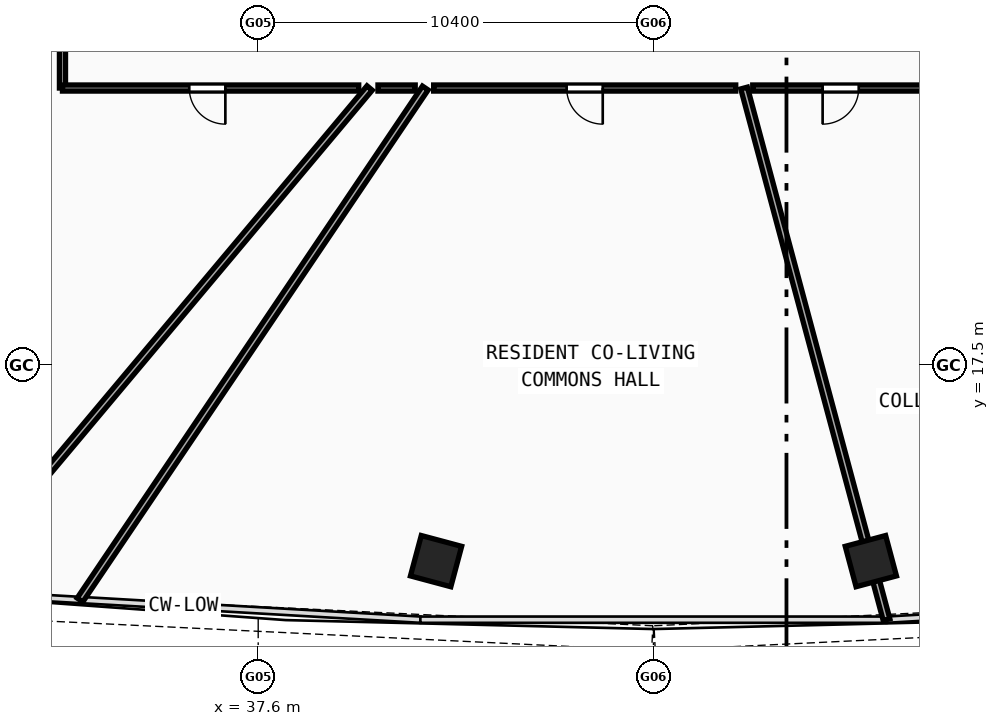
"""IFC4 building model, lengths in metres.
Left out: names, types, materials, properties, quantities, classifications, styles, units other than length and angle.
Written with IfcOpenShell. Run it as: python <this file> out.ifc"""

import sys

from ifc_helpers import new_model, si_unit, direction, frame, frame_2d, origin, origin_with_axes, origin_2d, place, context, subcontext, project, spatial, rectangle, hollow_rectangle, extrude, source, transform, mapped, element, fill, save


model = new_model("IFC4")
c1 = context("Model", 3, precision=1e-05, world=origin(), true_north=direction((0.0, 1.0)))
c2 = subcontext(c1, "Body", "Model", "MODEL_VIEW")
j1 = project(units=[si_unit("LENGTHUNIT", "METRE"), si_unit("PLANEANGLEUNIT", "RADIAN")], contexts=[c1])
p1 = place(None, origin())
s1 = spatial("IfcSite", under=j1, at=p1, CompositionType="ELEMENT")
p2 = place(p1, origin())
s2 = spatial("IfcBuilding", under=s1, at=p2, CompositionType="ELEMENT")
p3 = place(p2, frame((0.0, 0.0, 41.29)))
s3 = spatial("IfcBuildingStorey", under=s2, at=p3, CompositionType="ELEMENT", Elevation=41.29)
m1 = source(origin(), c2, "Body", "SweptSolid", [
    extrude(hollow_rectangle(XDim=1.1, YDim=1.1, WallThickness=0.045, at=origin_2d()), origin(), (0.0, 0.0, 1.0), 3.63),
])
for number, where, z_axis, x_axis in (
    (1, (42.28, 12.352, -0.26), (0.0, 0.0, 1.0), (0.966, -0.259, 0.0)),
    (2, (53.72, 12.352, -0.26), (0.0, 0.0, 1.0), (0.966, 0.259, 0.0)),
):
    element("IfcColumn", number, at=place(p3, frame(where, z_axis=z_axis, x_axis=x_axis)), inside=s3, PredefinedType="COLUMN", context=c2, shape_type="MappedRepresentation", body=[
        mapped(m1, transform((0.0, 0.0, 0.0), scale=1.0)),
    ])
p4 = place(p3, frame((40.532, 24.8, 0.0), z_axis=(0.0, 0.0, 1.0), x_axis=(-0.642784696521, -0.766046887546, 0.0)))
e3 = element("IfcWall", 3, at=p4, inside=s3, PredefinedType="PARTITIONING", context=c2, shape_type="SweptSolid", body=[
    extrude(rectangle(XDim=17.319, YDim=0.18, at=frame_2d((8.659, 0.0))), origin(), (0.0, 0.0, 1.0), 2.67),
])
p5 = place(p3, frame((41.997, 24.8, 0.0), z_axis=(0.0, 0.0, 1.0), x_axis=(-0.559182499599, -0.82904458996, 0.0)))
e4 = element("IfcWall", 4, at=p5, inside=s3, PredefinedType="PARTITIONING", context=c2, shape_type="SweptSolid", body=[
    extrude(rectangle(XDim=16.248, YDim=0.18, at=frame_2d((8.124, 0.0))), origin(), (0.0, 0.0, 1.0), 2.67),
])
p6 = place(p3, frame((50.385, 24.8, 0.0), z_axis=(0.0, 0.0, 1.0), x_axis=(0.258819787056, -0.965925627483, 0.0)))
e5 = element("IfcWall", 5, at=p6, inside=s3, PredefinedType="PARTITIONING", context=c2, shape_type="SweptSolid", body=[
    extrude(rectangle(XDim=14.482, YDim=0.18, at=frame_2d((7.241, 0.0))), origin(), (0.0, 0.0, 1.0), 2.67),
])
p7 = place(p3, frame((32.45, 24.8, 0.0), z_axis=(0.0, 0.0, 1.0), x_axis=(0.0, 1.0, 0.0)))
e6 = element("IfcWall", 6, at=p7, inside=s3, PredefinedType="PARTITIONING", context=c2, shape_type="SweptSolid", body=[
    extrude(rectangle(XDim=5.935, YDim=0.16, at=frame_2d((2.967, 0.0))), origin(), (0.0, 0.0, 1.0), 2.97),
])
p8 = place(p3, frame((55.248, 24.8, 0.0), z_axis=(0.0, 0.0, 1.0), x_axis=(-1.0, 0.0, 0.0)))
e7 = element("IfcWall", 7, at=p8, inside=s3, PredefinedType="PARTITIONING", context=c2, shape_type="SweptSolid", body=[
    extrude(rectangle(XDim=4.635, YDim=0.16, at=frame_2d((2.318, 0.0))), origin(), (0.0, 0.0, 1.0), 2.67),
])
p9 = place(p8, frame((1.847, 0.0, 0.0)))
e8 = element("IfcOpeningElement", 8, at=p9, cuts=e7, PredefinedType="OPENING", context=c2, shape_type="SweptSolid", body=[
    extrude(rectangle(XDim=0.95, YDim=2.1, at=frame_2d((0.475, 1.05))), frame((0.0, 0.09, 0.0), z_axis=(0.0, -1.0, 0.0), x_axis=(1.0, 0.0, 0.0)), (0.0, 0.0, 1.0), 0.18),
])
p10 = place(p3, frame((50.165, 24.8, 0.0), z_axis=(0.0, 0.0, 1.0), x_axis=(-1.0, 0.0, 0.0)))
e9 = element("IfcWall", 9, at=p10, inside=s3, PredefinedType="PARTITIONING", context=c2, shape_type="SweptSolid", body=[
    extrude(rectangle(XDim=7.948, YDim=0.16, at=frame_2d((3.974, 0.0))), origin(), (0.0, 0.0, 1.0), 2.67),
])
p11 = place(p10, frame((3.499, 0.0, 0.0)))
e10 = element("IfcOpeningElement", 10, at=p11, cuts=e9, PredefinedType="OPENING", context=c2, shape_type="SweptSolid", body=[
    extrude(rectangle(XDim=0.95, YDim=2.1, at=frame_2d((0.475, 1.05))), frame((0.0, 0.09, 0.0), z_axis=(0.0, -1.0, 0.0), x_axis=(1.0, 0.0, 0.0)), (0.0, 0.0, 1.0), 0.18),
])
p12 = place(p3, frame((41.731, 24.8, 0.0), z_axis=(0.0, 0.0, 1.0), x_axis=(-1.0, 0.0, 0.0)))
e11 = element("IfcWall", 11, at=p12, inside=s3, PredefinedType="PARTITIONING", context=c2, shape_type="SweptSolid", body=[
    extrude(rectangle(XDim=0.979, YDim=0.16, at=frame_2d((0.49, 0.0))), origin(), (0.0, 0.0, 1.0), 2.67),
])
p13 = place(p3, frame((40.245, 24.8, 0.0), z_axis=(0.0, 0.0, 1.0), x_axis=(-1.0, 0.0, 0.0)))
e12 = element("IfcWall", 12, at=p13, inside=s3, PredefinedType="PARTITIONING", context=c2, shape_type="SweptSolid", body=[
    extrude(rectangle(XDim=7.795, YDim=0.16, at=frame_2d((3.897, 0.0))), origin(), (0.0, 0.0, 1.0), 2.97),
])
p14 = place(p13, frame((3.509, 0.0, 0.0)))
e13 = element("IfcOpeningElement", 13, at=p14, cuts=e12, PredefinedType="OPENING", context=c2, shape_type="SweptSolid", body=[
    extrude(rectangle(XDim=0.95, YDim=2.1, at=frame_2d((0.475, 1.05))), frame((0.0, 0.09, 0.0), z_axis=(0.0, -1.0, 0.0), x_axis=(1.0, 0.0, 0.0)), (0.0, 0.0, 1.0), 0.18),
])
m2 = source(origin(), c2, "Body", "SweptSolid", [
    extrude(rectangle(XDim=0.95, YDim=2.1, at=frame_2d((0.475, 1.05))), frame((0.0, 0.025, 0.0), z_axis=(0.0, -1.0, 0.0), x_axis=(1.0, 0.0, 0.0)), (0.0, 0.0, 1.0), 0.05),
])
p15 = place(p14, origin_with_axes())
e14 = element("IfcDoor", 14, at=p15, inside=s3, OperationType="SINGLE_SWING_LEFT", PredefinedType="DOOR", context=c2, shape_type="MappedRepresentation", body=[
    mapped(m2, transform((0.0, 0.0, 0.0), scale=1.0)),
])
fill(e13, e14)
p16 = place(p11, origin_with_axes())
e15 = element("IfcDoor", 15, at=p16, inside=s3, OperationType="SINGLE_SWING_LEFT", PredefinedType="DOOR", context=c2, shape_type="MappedRepresentation", body=[
    mapped(m2, transform((0.0, 0.0, 0.0), scale=1.0)),
])
fill(e10, e15)
p17 = place(p9, origin_with_axes())
e16 = element("IfcDoor", 16, at=p17, inside=s3, OperationType="SINGLE_SWING_RIGHT", PredefinedType="DOOR", context=c2, shape_type="MappedRepresentation", body=[
    mapped(m2, transform((0.0, 0.0, 0.0), scale=1.0)),
])
fill(e8, e16)
save(model, sys.argv[1])
